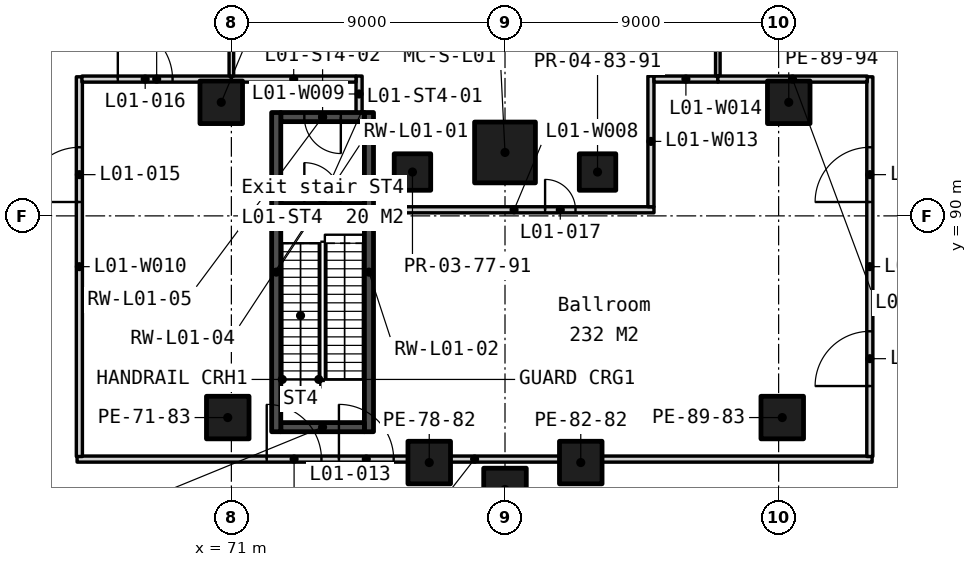
"""IFC4 building model, lengths in metres.
Left out: names, types, materials, properties, quantities, classifications, styles, units other than length and angle.
Written with IfcOpenShell. Run it as: python <this file> out.ifc"""

import sys

from ifc_helpers import new_model, si_unit, direction, frame, frame_2d, origin, origin_2d, place, context, subcontext, project, spatial, rectangle, extrude, element, fill, save


model = new_model("IFC4")
c1 = context("Model", 3, precision=1e-05, world=origin(), true_north=direction((0.0, 1.0)))
c2 = subcontext(c1, "Body", "Model", "MODEL_VIEW")
j1 = project(units=[si_unit("LENGTHUNIT", "METRE"), si_unit("PLANEANGLEUNIT", "RADIAN")], contexts=[c1])
p1 = place(None, origin())
s1 = spatial("IfcSite", under=j1, at=p1, CompositionType="ELEMENT")
p2 = place(p1, origin())
s2 = spatial("IfcBuilding", under=s1, at=p2, CompositionType="ELEMENT")
p3 = place(p2, frame((0.0, 0.0, 7.5)))
s3 = spatial("IfcBuildingStorey", under=s2, at=p3, CompositionType="ELEMENT", Elevation=7.5)
for number, where, z_axis, x_axis in (
    (1, (80.0, 81.0, 0.0), (0.0, 0.0, 1.0), (1.0, 0.0, 0.0)),
    (2, (70.881, 83.366, 0.0), (0.0, 0.0, 1.0), (1.0, 0.0, 0.0)),
    (3, (70.667, 93.736, 0.0), (0.0, 0.0, 1.0), (1.0, 0.0, 0.0)),
    (4, (77.508, 81.886, 0.0), (0.0, 0.0, 1.0), (1.0, 0.0, 0.0)),
    (5, (82.492, 81.886, 0.0), (0.0, 0.0, 1.0), (1.0, 0.0, 0.0)),
    (6, (89.119, 83.366, 0.0), (0.0, 0.0, 1.0), (1.0, 0.0, 0.0)),
    (7, (89.333, 93.736, 0.0), (0.0, 0.0, 1.0), (1.0, 0.0, 0.0)),
):
    element("IfcColumn", number, at=place(p3, frame(where, z_axis=z_axis, x_axis=x_axis)), inside=s3, PredefinedType="COLUMN", context=c2, shape_type="SweptSolid", body=[
        extrude(rectangle(XDim=1.4, YDim=1.4, at=origin_2d()), origin(), (0.0, 0.0, 1.0), 6.0),
    ])
for number, where, z_axis, x_axis in (
    (8, (76.956, 91.442, 0.0), (0.0, 0.0, 1.0), (1.0, 0.0, 0.0)),
    (9, (83.044, 91.442, 0.0), (0.0, 0.0, 1.0), (1.0, 0.0, 0.0)),
):
    element("IfcColumn", number, at=place(p3, frame(where, z_axis=z_axis, x_axis=x_axis)), inside=s3, PredefinedType="COLUMN", context=c2, shape_type="SweptSolid", body=[
        extrude(rectangle(XDim=1.2, YDim=1.2, at=origin_2d()), origin(), (0.0, 0.0, 1.0), 6.0),
    ])
p4 = place(p3, frame((80.0, 92.086, 0.0), z_axis=(0.0, 0.0, 1.0), x_axis=(1.0, 0.0, 0.0)))
e10 = element("IfcColumn", 10, at=p4, inside=s3, PredefinedType="COLUMN", context=c2, shape_type="SweptSolid", body=[
    extrude(rectangle(XDim=2.0, YDim=2.0, at=origin_2d()), origin(), (0.0, 0.0, 1.0), 6.0),
])
for number, where, z_axis, x_axis in (
    (11, (72.475, 82.9, 0.0), (0.0, 0.0, 1.0), (0.0, 1.0, 0.0)),
    (12, (75.525, 82.9, 0.0), (0.0, 0.0, 1.0), (0.0, 1.0, 0.0)),
):
    element("IfcWall", number, at=place(p3, frame(where, z_axis=z_axis, x_axis=x_axis)), inside=s3, PredefinedType="SOLIDWALL", context=c2, shape_type="SweptSolid", body=[
        extrude(rectangle(XDim=10.5, YDim=0.3, at=frame_2d((5.25, 0.0))), origin(), (0.0, 0.0, 1.0), 5.7),
    ])
p5 = place(p3, frame((72.625, 83.05, 0.0), z_axis=(0.0, 0.0, 1.0), x_axis=(1.0, 0.0, 0.0)))
e13 = element("IfcWall", 13, at=p5, inside=s3, PredefinedType="SOLIDWALL", context=c2, shape_type="SweptSolid", body=[
    extrude(rectangle(XDim=2.75, YDim=0.3, at=frame_2d((1.375, 0.0))), origin(), (0.0, 0.0, 1.0), 5.7),
])
p6 = place(p3, frame((72.625, 90.55, 0.0), z_axis=(0.0, 0.0, 1.0), x_axis=(1.0, 0.0, 0.0)))
e14 = element("IfcWall", 14, at=p6, inside=s3, PredefinedType="SOLIDWALL", context=c2, shape_type="SweptSolid", body=[
    extrude(rectangle(XDim=2.75, YDim=0.3, at=frame_2d((1.375, 0.0))), origin(), (0.0, 0.0, 1.0), 5.7),
])
p7 = place(p6, frame((0.775, 0.0, 0.0)))
e15 = element("IfcOpeningElement", 15, at=p7, cuts=e14, PredefinedType="OPENING", context=c2, shape_type="SweptSolid", body=[
    extrude(rectangle(XDim=1.2, YDim=2.1, at=frame_2d((0.6, 1.05))), frame((0.0, 0.16, 0.0), z_axis=(0.0, -1.0, 0.0), x_axis=(1.0, 0.0, 0.0)), (0.0, 0.0, 1.0), 0.32),
])
p8 = place(p3, frame((72.625, 93.25, 0.0), z_axis=(0.0, 0.0, 1.0), x_axis=(1.0, 0.0, 0.0)))
e16 = element("IfcWall", 16, at=p8, inside=s3, PredefinedType="SOLIDWALL", context=c2, shape_type="SweptSolid", body=[
    extrude(rectangle(XDim=2.75, YDim=0.3, at=frame_2d((1.375, 0.0))), origin(), (0.0, 0.0, 1.0), 5.7),
])
p9 = place(p8, frame((0.775, 0.0, 0.0)))
e17 = element("IfcOpeningElement", 17, at=p9, cuts=e16, PredefinedType="OPENING", context=c2, shape_type="SweptSolid", body=[
    extrude(rectangle(XDim=1.2, YDim=2.1, at=frame_2d((0.6, 1.05))), frame((0.0, 0.16, 0.0), z_axis=(0.0, -1.0, 0.0), x_axis=(1.0, 0.0, 0.0)), (0.0, 0.0, 1.0), 0.32),
])
p10 = place(p3, frame((42.282, 110.0, 0.0), z_axis=(0.0, 0.0, 1.0), x_axis=(0.499999730012, -0.866025559662, 0.0)))
e18 = element("IfcWall", 18, at=p10, inside=s3, PredefinedType="PARTITIONING", context=c2, shape_type="SweptSolid", body=[
    extrude(rectangle(XDim=46.188, YDim=0.15, at=frame_2d((23.094, 0.0))), origin(), (0.0, 0.0, 1.0), 5.7),
])
p11 = place(p10, frame((24.383, 0.0, 0.0)))
e19 = element("IfcOpeningElement", 19, at=p11, cuts=e18, PredefinedType="OPENING", context=c2, shape_type="SweptSolid", body=[
    extrude(rectangle(XDim=1.8, YDim=2.1, at=frame_2d((0.9, 1.05))), frame((0.0, 0.085, 0.0), z_axis=(0.0, -1.0, 0.0), x_axis=(1.0, 0.0, 0.0)), (0.0, 0.0, 1.0), 0.17),
])
p12 = place(p3, frame((65.926, 82.0, 0.0), z_axis=(0.0, 0.0, 1.0), x_axis=(1.0, 0.0, 0.0)))
e20 = element("IfcWall", 20, at=p12, inside=s3, PredefinedType="PARTITIONING", context=c2, shape_type="SweptSolid", body=[
    extrude(rectangle(XDim=26.149, YDim=0.2, at=frame_2d((13.074, 0.0))), origin(), (0.0, 0.0, 1.0), 5.7),
])
p13 = place(p12, frame((8.612, 0.0, 0.0)))
e21 = element("IfcOpeningElement", 21, at=p13, cuts=e20, PredefinedType="OPENING", context=c2, shape_type="SweptSolid", body=[
    extrude(rectangle(XDim=1.8, YDim=2.1, at=frame_2d((0.9, 1.05))), frame((0.0, 0.11, 0.0), z_axis=(0.0, -1.0, 0.0), x_axis=(1.0, 0.0, 0.0)), (0.0, 0.0, 1.0), 0.22),
])
p14 = place(p12, frame((6.237, 0.0, 0.0)))
e22 = element("IfcOpeningElement", 22, at=p14, cuts=e20, PredefinedType="OPENING", context=c2, shape_type="SweptSolid", body=[
    extrude(rectangle(XDim=1.8, YDim=2.1, at=frame_2d((0.9, 1.05))), frame((0.0, 0.11, 0.0), z_axis=(0.0, -1.0, 0.0), x_axis=(1.0, 0.0, 0.0)), (0.0, 0.0, 1.0), 0.22),
])
p15 = place(p3, frame((92.0, 82.085, 0.0), z_axis=(0.0, 0.0, 1.0), x_axis=(3.9095334e-05, 0.999999999236, 0.0)))
e23 = element("IfcWall", 23, at=p15, inside=s3, PredefinedType="PARTITIONING", context=c2, shape_type="SweptSolid", body=[
    extrude(rectangle(XDim=12.49, YDim=0.2, at=frame_2d((6.245, 0.0))), origin(), (0.0, 0.0, 1.0), 5.7),
])
p16 = place(p15, frame((2.318, 0.0, 0.0)))
e24 = element("IfcOpeningElement", 24, at=p16, cuts=e23, PredefinedType="OPENING", context=c2, shape_type="SweptSolid", body=[
    extrude(rectangle(XDim=1.8, YDim=2.1, at=frame_2d((0.9, 1.05))), frame((0.0, 0.11, 0.0), z_axis=(0.0, -1.0, 0.0), x_axis=(1.0, 0.0, 0.0)), (0.0, 0.0, 1.0), 0.22),
])
p17 = place(p15, frame((8.372, 0.0, 0.0)))
e25 = element("IfcOpeningElement", 25, at=p17, cuts=e23, PredefinedType="OPENING", context=c2, shape_type="SweptSolid", body=[
    extrude(rectangle(XDim=1.8, YDim=2.1, at=frame_2d((0.9, 1.05))), frame((0.0, 0.11, 0.0), z_axis=(0.0, -1.0, 0.0), x_axis=(1.0, 0.0, 0.0)), (0.0, 0.0, 1.0), 0.22),
])
p18 = place(p3, frame((75.695, 90.2, 0.0), z_axis=(0.0, 0.0, 1.0), x_axis=(1.0, 0.0, 0.0)))
e26 = element("IfcWall", 26, at=p18, inside=s3, PredefinedType="PARTITIONING", context=c2, shape_type="SweptSolid", body=[
    extrude(rectangle(XDim=9.205, YDim=0.2, at=frame_2d((4.603, 0.0))), origin(), (0.0, 0.0, 1.0), 5.7),
])
p19 = place(p18, frame((5.624, 0.0, 0.0)))
e27 = element("IfcOpeningElement", 27, at=p19, cuts=e26, PredefinedType="OPENING", context=c2, shape_type="SweptSolid", body=[
    extrude(rectangle(XDim=1.0, YDim=2.1, at=frame_2d((0.5, 1.05))), frame((0.0, 0.11, 0.0), z_axis=(0.0, -1.0, 0.0), x_axis=(1.0, 0.0, 0.0)), (0.0, 0.0, 1.0), 0.22),
])
p20 = place(p3, frame((75.2, 93.42, 0.0), z_axis=(0.0, 0.0, 1.0), x_axis=(0.0, 1.0, 0.0)))
e28 = element("IfcWall", 28, at=p20, inside=s3, PredefinedType="PARTITIONING", context=c2, shape_type="SweptSolid", body=[
    extrude(rectangle(XDim=1.18, YDim=0.2, at=frame_2d((0.59, 0.0))), origin(), (0.0, 0.0, 1.0), 5.7),
])
p21 = place(p3, frame((66.0, 82.085, 0.0), z_axis=(0.0, 0.0, 1.0), x_axis=(-3.9095334e-05, 0.999999999236, 0.0)))
e29 = element("IfcWall", 29, at=p21, inside=s3, PredefinedType="PARTITIONING", context=c2, shape_type="SweptSolid", body=[
    extrude(rectangle(XDim=12.49, YDim=0.2, at=frame_2d((6.245, 0.0))), origin(), (0.0, 0.0, 1.0), 5.7),
])
p22 = place(p21, frame((8.372, 0.0, 0.0)))
e30 = element("IfcOpeningElement", 30, at=p22, cuts=e29, PredefinedType="OPENING", context=c2, shape_type="SweptSolid", body=[
    extrude(rectangle(XDim=1.8, YDim=2.1, at=frame_2d((0.9, 1.05))), frame((0.0, 0.11, 0.0), z_axis=(0.0, -1.0, 0.0), x_axis=(1.0, 0.0, 0.0)), (0.0, 0.0, 1.0), 0.22),
])
p23 = place(p3, frame((66.085, 94.5, 0.0), z_axis=(0.0, 0.0, 1.0), x_axis=(0.999999995065, 9.9344327e-05, 0.0)))
e31 = element("IfcWall", 31, at=p23, inside=s3, PredefinedType="PARTITIONING", context=c2, shape_type="SweptSolid", body=[
    extrude(rectangle(XDim=4.915, YDim=0.2, at=frame_2d((2.458, 0.0))), origin(), (0.0, 0.0, 1.0), 5.7),
])
p24 = place(p23, frame((1.18, 0.0, 0.0)))
e32 = element("IfcOpeningElement", 32, at=p24, cuts=e31, PredefinedType="OPENING", context=c2, shape_type="SweptSolid", body=[
    extrude(rectangle(XDim=1.8, YDim=2.1, at=frame_2d((0.9, 1.05))), frame((0.0, 0.11, 0.0), z_axis=(0.0, -1.0, 0.0), x_axis=(1.0, 0.0, 0.0)), (0.0, 0.0, 1.0), 0.22),
])
p25 = place(p3, frame((71.0, 94.5, 0.0), z_axis=(0.0, 0.0, 1.0), x_axis=(1.0, 0.0, 0.0)))
e33 = element("IfcWall", 33, at=p25, inside=s3, PredefinedType="PARTITIONING", context=c2, shape_type="SweptSolid", body=[
    extrude(rectangle(XDim=4.1, YDim=0.2, at=frame_2d((2.05, 0.0))), origin(), (0.0, 0.0, 1.0), 5.7),
])
p26 = place(p3, frame((84.8, 90.3, 0.0), z_axis=(0.0, 0.0, 1.0), x_axis=(0.0, 1.0, 0.0)))
e34 = element("IfcWall", 34, at=p26, inside=s3, PredefinedType="PARTITIONING", context=c2, shape_type="SweptSolid", body=[
    extrude(rectangle(XDim=4.3, YDim=0.2, at=frame_2d((2.15, 0.0))), origin(), (0.0, 0.0, 1.0), 5.7),
])
p27 = place(p3, frame((84.9, 94.5, 0.0), z_axis=(0.0, 0.0, 1.0), x_axis=(1.0, 0.0, 0.0)))
e35 = element("IfcWall", 35, at=p27, inside=s3, PredefinedType="PARTITIONING", context=c2, shape_type="SweptSolid", body=[
    extrude(rectangle(XDim=2.1, YDim=0.2, at=frame_2d((1.05, 0.0))), origin(), (0.0, 0.0, 1.0), 5.7),
])
p28 = place(p3, frame((87.0, 94.6, 0.0), z_axis=(0.0, 0.0, 1.0), x_axis=(0.0, 1.0, 0.0)))
e36 = element("IfcWall", 36, at=p28, inside=s3, PredefinedType="PARTITIONING", context=c2, shape_type="SweptSolid", body=[
    extrude(rectangle(XDim=9.474, YDim=0.15, at=frame_2d((4.737, 0.0))), origin(), (0.0, 0.0, 1.0), 4.839),
])
p29 = place(p3, frame((87.0, 94.5, 0.0), z_axis=(0.0, 0.0, 1.0), x_axis=(0.999999995065, -9.9344327e-05, 0.0)))
e37 = element("IfcWall", 37, at=p29, inside=s3, PredefinedType="PARTITIONING", context=c2, shape_type="SweptSolid", body=[
    extrude(rectangle(XDim=4.915, YDim=0.2, at=frame_2d((2.458, 0.0))), origin(), (0.0, 0.0, 1.0), 5.7),
])
p30 = place(p3, frame((71.0, 94.6, 0.0), z_axis=(0.0, 0.0, 1.0), x_axis=(0.0, 1.0, 0.0)))
e38 = element("IfcWall", 38, at=p30, inside=s3, PredefinedType="PARTITIONING", context=c2, shape_type="SweptSolid", body=[
    extrude(rectangle(XDim=6.47, YDim=0.15, at=frame_2d((3.235, 0.0))), origin(), (0.0, 0.0, 1.0), 5.7),
])
p31 = place(p7, origin())
e39 = element("IfcDoor", 39, at=p31, inside=s3, OperationType="SINGLE_SWING_LEFT", PredefinedType="DOOR", context=c2, shape_type="SweptSolid", body=[
    extrude(rectangle(XDim=1.2, YDim=2.1, at=frame_2d((0.6, 1.05))), frame((0.0, 0.025, 0.0), z_axis=(0.0, -1.0, 0.0), x_axis=(1.0, 0.0, 0.0)), (0.0, 0.0, 1.0), 0.05),
])
fill(e15, e39)
p32 = place(p9, origin())
e40 = element("IfcDoor", 40, at=p32, inside=s3, OperationType="SINGLE_SWING_RIGHT", PredefinedType="DOOR", context=c2, shape_type="SweptSolid", body=[
    extrude(rectangle(XDim=1.2, YDim=2.1, at=frame_2d((0.6, 1.05))), frame((0.0, 0.025, 0.0), z_axis=(0.0, -1.0, 0.0), x_axis=(1.0, 0.0, 0.0)), (0.0, 0.0, 1.0), 0.05),
])
fill(e17, e40)
p33 = place(p13, origin())
e41 = element("IfcDoor", 41, at=p33, inside=s3, OperationType="SINGLE_SWING_LEFT", PredefinedType="DOOR", context=c2, shape_type="SweptSolid", body=[
    extrude(rectangle(XDim=1.8, YDim=2.1, at=frame_2d((0.9, 1.05))), frame((0.0, 0.025, 0.0), z_axis=(0.0, -1.0, 0.0), x_axis=(1.0, 0.0, 0.0)), (0.0, 0.0, 1.0), 0.05),
])
fill(e21, e41)
p34 = place(p16, origin())
e42 = element("IfcDoor", 42, at=p34, inside=s3, OperationType="SINGLE_SWING_LEFT", PredefinedType="DOOR", context=c2, shape_type="SweptSolid", body=[
    extrude(rectangle(XDim=1.8, YDim=2.1, at=frame_2d((0.9, 1.05))), frame((0.0, 0.025, 0.0), z_axis=(0.0, -1.0, 0.0), x_axis=(1.0, 0.0, 0.0)), (0.0, 0.0, 1.0), 0.05),
])
fill(e24, e42)
p35 = place(p22, origin())
e43 = element("IfcDoor", 43, at=p35, inside=s3, OperationType="SINGLE_SWING_LEFT", PredefinedType="DOOR", context=c2, shape_type="SweptSolid", body=[
    extrude(rectangle(XDim=1.8, YDim=2.1, at=frame_2d((0.9, 1.05))), frame((0.0, 0.025, 0.0), z_axis=(0.0, -1.0, 0.0), x_axis=(1.0, 0.0, 0.0)), (0.0, 0.0, 1.0), 0.05),
])
fill(e30, e43)
p36 = place(p24, origin())
e44 = element("IfcDoor", 44, at=p36, inside=s3, OperationType="SINGLE_SWING_LEFT", PredefinedType="DOOR", context=c2, shape_type="SweptSolid", body=[
    extrude(rectangle(XDim=1.8, YDim=2.1, at=frame_2d((0.9, 1.05))), frame((0.0, 0.025, 0.0), z_axis=(0.0, -1.0, 0.0), x_axis=(1.0, 0.0, 0.0)), (0.0, 0.0, 1.0), 0.05),
])
fill(e32, e44)
p37 = place(p19, origin())
e45 = element("IfcDoor", 45, at=p37, inside=s3, OperationType="SINGLE_SWING_LEFT", PredefinedType="DOOR", context=c2, shape_type="SweptSolid", body=[
    extrude(rectangle(XDim=1.0, YDim=2.1, at=frame_2d((0.5, 1.05))), frame((0.0, 0.025, 0.0), z_axis=(0.0, -1.0, 0.0), x_axis=(1.0, 0.0, 0.0)), (0.0, 0.0, 1.0), 0.05),
])
fill(e27, e45)
p38 = place(p14, origin())
e46 = element("IfcDoor", 46, at=p38, inside=s3, OperationType="SINGLE_SWING_LEFT", PredefinedType="DOOR", context=c2, shape_type="SweptSolid", body=[
    extrude(rectangle(XDim=1.8, YDim=2.1, at=frame_2d((0.9, 1.05))), frame((0.0, 0.025, 0.0), z_axis=(0.0, -1.0, 0.0), x_axis=(1.0, 0.0, 0.0)), (0.0, 0.0, 1.0), 0.05),
])
fill(e22, e46)
p39 = place(p17, origin())
e47 = element("IfcDoor", 47, at=p39, inside=s3, OperationType="SINGLE_SWING_LEFT", PredefinedType="DOOR", context=c2, shape_type="SweptSolid", body=[
    extrude(rectangle(XDim=1.8, YDim=2.1, at=frame_2d((0.9, 1.05))), frame((0.0, 0.025, 0.0), z_axis=(0.0, -1.0, 0.0), x_axis=(1.0, 0.0, 0.0)), (0.0, 0.0, 1.0), 0.05),
])
fill(e25, e47)
save(model, sys.argv[1])
